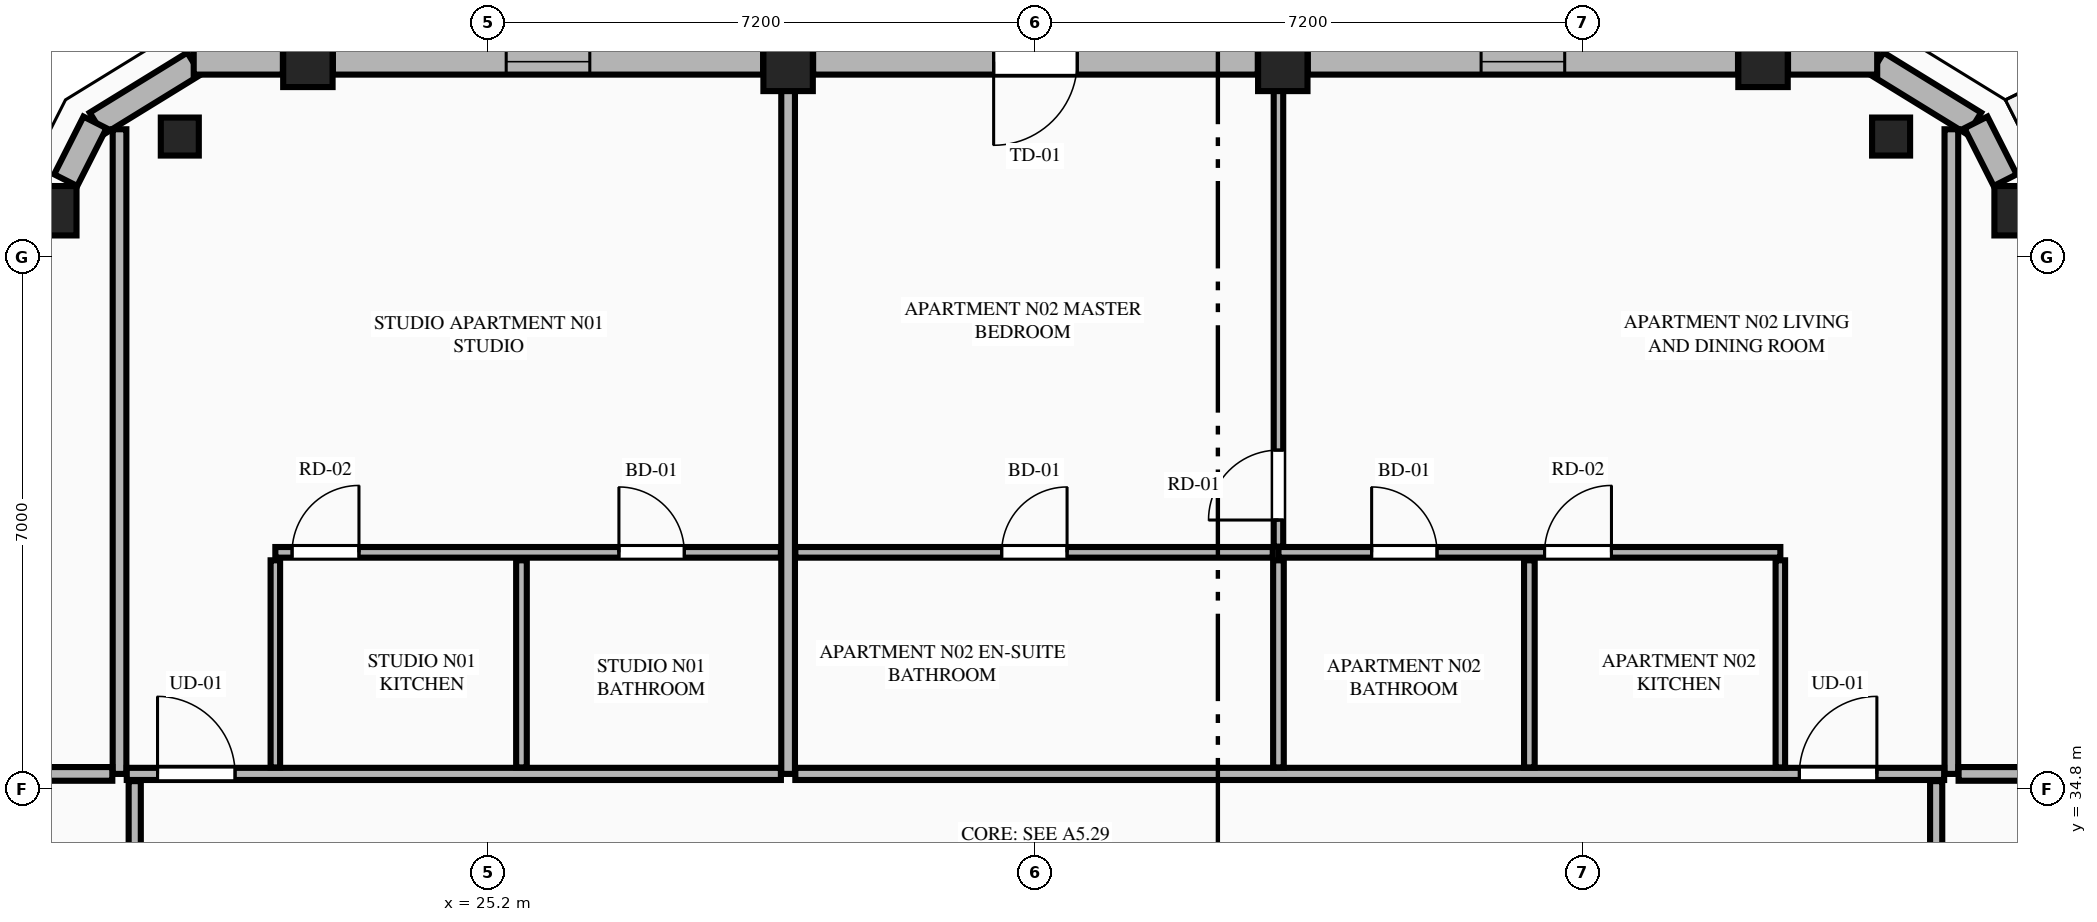
"""IFC4 building model, lengths in metres.
Left out: names, types, materials, properties, quantities, classifications, styles, units other than length and angle.
Written with IfcOpenShell. Run it as: python <this file> out.ifc"""

import sys

from ifc_helpers import new_model, si_unit, direction, frame, frame_2d, origin, origin_2d, place, context, subcontext, project, spatial, rectangle, extrude, element, fill, save


model = new_model("IFC4")
c1 = context("Model", 3, precision=1e-05, world=origin(), true_north=direction((0.0, 1.0)))
c2 = subcontext(c1, "Body", "Model", "MODEL_VIEW")
j1 = project(units=[si_unit("LENGTHUNIT", "METRE"), si_unit("PLANEANGLEUNIT", "RADIAN")], contexts=[c1])
p1 = place(None, origin())
s1 = spatial("IfcSite", under=j1, at=p1, CompositionType="ELEMENT")
p2 = place(p1, origin())
s2 = spatial("IfcBuilding", under=s1, at=p2, CompositionType="ELEMENT")
p3 = place(p2, frame((0.0, 0.0, 287.5)))
s3 = spatial("IfcBuildingStorey", under=s2, at=p3, CompositionType="ELEMENT", Elevation=287.5)
for number, where, z_axis, x_axis in (
    (1, (45.341, 42.409, 0.0), (0.0, 0.0, 1.0), (1.0, 0.0, 0.0)),
    (2, (41.972, 44.361, 0.0), (0.0, 0.0, 1.0), (1.0, 0.0, 0.0)),
    (3, (35.654, 44.308, 0.0), (0.0, 0.0, 1.0), (1.0, 0.0, 0.0)),
    (4, (29.146, 44.308, 0.0), (0.0, 0.0, 1.0), (1.0, 0.0, 0.0)),
    (5, (22.828, 44.361, 0.0), (0.0, 0.0, 1.0), (1.0, 0.0, 0.0)),
    (6, (19.459, 42.409, 0.0), (0.0, 0.0, 1.0), (1.0, 0.0, 0.0)),
):
    element("IfcColumn", number, at=place(p3, frame(where, z_axis=z_axis, x_axis=x_axis)), inside=s3, PredefinedType="COLUMN", context=c2, shape_type="SweptSolid", body=[
        extrude(rectangle(XDim=0.65, YDim=0.65, at=origin_2d()), origin(), (0.0, 0.0, 1.0), 4.0),
    ])
for number, where, z_axis, x_axis in (
    (7, (43.657, 43.385, 0.0), (0.0, 0.0, 1.0), (-0.865, 0.501, 0.0)),
    (8, (21.143, 43.385, 0.0), (0.0, 0.0, 1.0), (-0.865, -0.501, 0.0)),
):
    element("IfcColumn", number, at=place(p3, frame(where, z_axis=z_axis, x_axis=x_axis)), inside=s3, PredefinedType="PILASTER", context=c2, shape_type="SweptSolid", body=[
        extrude(rectangle(XDim=0.5, YDim=0.35, at=origin_2d()), origin(), (0.0, 0.0, 1.0), 4.0),
    ])
for number, where, z_axis, x_axis in (
    (9, (44.753, 43.555, 0.0), (0.0, 0.0, 1.0), (-0.852, 0.524, 0.0)),
    (10, (21.331, 44.345, 0.0), (0.0, 0.0, 1.0), (-0.852, -0.524, 0.0)),
):
    element("IfcWall", number, at=place(p3, frame(where, z_axis=z_axis, x_axis=x_axis)), inside=s3, PredefinedType="STANDARD", context=c2, shape_type="SweptSolid", body=[
        extrude(rectangle(XDim=1.508, YDim=0.34, at=frame_2d((0.754, 0.0))), origin(), (0.0, 0.0, 1.0), 3.8),
    ])
p4 = place(p3, frame((45.158, 42.811, 0.0), z_axis=(0.0, 0.0, 1.0), x_axis=(-0.451907025977, 0.8920650424, 0.0)))
e11 = element("IfcWall", 11, at=p4, inside=s3, PredefinedType="STANDARD", context=c2, shape_type="SweptSolid", body=[
    extrude(rectangle(XDim=0.852, YDim=0.34, at=frame_2d((0.426, 0.0))), origin(), (0.0, 0.0, 1.0), 3.8),
])
p5 = place(p3, frame((43.474, 44.37, 0.0), z_axis=(0.0, 0.0, 1.0), x_axis=(-1.0, 0.0, 0.0)))
e12 = element("IfcWall", 12, at=p5, inside=s3, PredefinedType="STANDARD", context=c2, shape_type="SweptSolid", body=[
    extrude(rectangle(XDim=1.173, YDim=0.34, at=frame_2d((0.586, 0.0))), origin(), (0.0, 0.0, 1.0), 3.8),
])
p6 = place(p3, frame((41.643, 44.37, 0.0), z_axis=(0.0, 0.0, 1.0), x_axis=(-1.0, 0.0, 0.0)))
e13 = element("IfcWall", 13, at=p6, inside=s3, PredefinedType="STANDARD", context=c2, shape_type="SweptSolid", body=[
    extrude(rectangle(XDim=5.66, YDim=0.34, at=frame_2d((2.83, 0.0))), origin(), (0.0, 0.0, 1.0), 2.99),
])
p7 = place(p6, frame((2.28, 0.0, 0.75)))
e14 = element("IfcOpeningElement", 14, at=p7, cuts=e13, PredefinedType="OPENING", context=c2, shape_type="SweptSolid", body=[
    extrude(rectangle(XDim=1.1, YDim=2.0, at=frame_2d((0.55, 1.0))), frame((0.0, 0.18, 0.0), z_axis=(0.0, -1.0, 0.0), x_axis=(1.0, 0.0, 0.0)), (0.0, 0.0, 1.0), 0.36),
])
p8 = place(p3, frame((35.325, 44.37, 0.0), z_axis=(0.0, 0.0, 1.0), x_axis=(-1.0, 0.0, 0.0)))
e15 = element("IfcWall", 15, at=p8, inside=s3, PredefinedType="STANDARD", context=c2, shape_type="SweptSolid", body=[
    extrude(rectangle(XDim=5.85, YDim=0.34, at=frame_2d((2.925, 0.0))), origin(), (0.0, 0.0, 1.0), 2.99),
])
p9 = place(p8, frame((2.375, 0.0, 0.0)))
e16 = element("IfcOpeningElement", 16, at=p9, cuts=e15, PredefinedType="OPENING", context=c2, shape_type="SweptSolid", body=[
    extrude(rectangle(XDim=1.1, YDim=2.25, at=frame_2d((0.55, 1.125))), frame((0.0, 0.18, 0.0), z_axis=(0.0, -1.0, 0.0), x_axis=(1.0, 0.0, 0.0)), (0.0, 0.0, 1.0), 0.36),
])
p10 = place(p3, frame((28.817, 44.37, 0.0), z_axis=(0.0, 0.0, 1.0), x_axis=(-1.0, 0.0, 0.0)))
e17 = element("IfcWall", 17, at=p10, inside=s3, PredefinedType="STANDARD", context=c2, shape_type="SweptSolid", body=[
    extrude(rectangle(XDim=5.66, YDim=0.34, at=frame_2d((2.83, 0.0))), origin(), (0.0, 0.0, 1.0), 2.99),
])
p11 = place(p10, frame((2.28, 0.0, 0.75)))
e18 = element("IfcOpeningElement", 18, at=p11, cuts=e17, PredefinedType="OPENING", context=c2, shape_type="SweptSolid", body=[
    extrude(rectangle(XDim=1.1, YDim=2.0, at=frame_2d((0.55, 1.0))), frame((0.0, 0.18, 0.0), z_axis=(0.0, -1.0, 0.0), x_axis=(1.0, 0.0, 0.0)), (0.0, 0.0, 1.0), 0.36),
])
p12 = place(p3, frame((22.499, 44.37, 0.0), z_axis=(0.0, 0.0, 1.0), x_axis=(-1.0, 0.0, 0.0)))
e19 = element("IfcWall", 19, at=p12, inside=s3, PredefinedType="STANDARD", context=c2, shape_type="SweptSolid", body=[
    extrude(rectangle(XDim=1.173, YDim=0.34, at=frame_2d((0.586, 0.0))), origin(), (0.0, 0.0, 1.0), 3.8),
])
p13 = place(p3, frame((20.027, 43.571, 0.0), z_axis=(0.0, 0.0, 1.0), x_axis=(-0.451907025977, -0.8920650424, 0.0)))
e20 = element("IfcWall", 20, at=p13, inside=s3, PredefinedType="STANDARD", context=c2, shape_type="SweptSolid", body=[
    extrude(rectangle(XDim=0.852, YDim=0.34, at=frame_2d((0.426, 0.0))), origin(), (0.0, 0.0, 1.0), 3.8),
])
p14 = place(p3, frame((20.35, 35.0, 0.0), z_axis=(0.0, 0.0, 1.0), x_axis=(0.0, 1.0, 0.0)))
e21 = element("IfcWall", 21, at=p14, inside=s3, PredefinedType="PARTITIONING", context=c2, shape_type="SweptSolid", body=[
    extrude(rectangle(XDim=8.481, YDim=0.18, at=frame_2d((4.24, 0.0))), origin(), (0.0, 0.0, 1.0), 3.8),
])
p15 = place(p3, frame((29.146, 35.0, 0.0), z_axis=(0.0, 0.0, 1.0), x_axis=(0.0, 1.0, 0.0)))
e22 = element("IfcWall", 22, at=p15, inside=s3, PredefinedType="PARTITIONING", context=c2, shape_type="SweptSolid", body=[
    extrude(rectangle(XDim=9.195, YDim=0.18, at=frame_2d((4.598, 0.0))), origin(), (0.0, 0.0, 1.0), 3.257),
])
p16 = place(p3, frame((44.45, 35.0, 0.0), z_axis=(0.0, 0.0, 1.0), x_axis=(0.0, 1.0, 0.0)))
e23 = element("IfcWall", 23, at=p16, inside=s3, PredefinedType="PARTITIONING", context=c2, shape_type="SweptSolid", body=[
    extrude(rectangle(XDim=8.481, YDim=0.18, at=frame_2d((4.24, 0.0))), origin(), (0.0, 0.0, 1.0), 3.8),
])
p17 = place(p3, frame((20.445, 35.0, 0.0), z_axis=(0.0, 0.0, 1.0), x_axis=(1.0, 0.0, 0.0)))
e24 = element("IfcWall", 24, at=p17, inside=s3, PredefinedType="PARTITIONING", context=c2, shape_type="SweptSolid", body=[
    extrude(rectangle(XDim=8.606, YDim=0.16, at=frame_2d((4.303, 0.0))), origin(), (0.0, 0.0, 1.0), 3.8),
])
p18 = place(p17, frame((0.405, 0.0, 0.0)))
e25 = element("IfcOpeningElement", 25, at=p18, cuts=e24, PredefinedType="OPENING", context=c2, shape_type="SweptSolid", body=[
    extrude(rectangle(XDim=1.02, YDim=2.25, at=frame_2d((0.51, 1.125))), frame((0.0, 0.09, 0.0), z_axis=(0.0, -1.0, 0.0), x_axis=(1.0, 0.0, 0.0)), (0.0, 0.0, 1.0), 0.18),
])
p19 = place(p3, frame((22.4, 35.085, 0.0), z_axis=(0.0, 0.0, 1.0), x_axis=(0.0, 1.0, 0.0)))
e26 = element("IfcWall", 26, at=p19, inside=s3, PredefinedType="PARTITIONING", context=c2, shape_type="SweptSolid", body=[
    extrude(rectangle(XDim=2.725, YDim=0.125, at=frame_2d((1.363, 0.0))), origin(), (0.0, 0.0, 1.0), 3.8),
])
p20 = place(p3, frame((22.4, 37.915, 0.0), z_axis=(0.0, 0.0, 1.0), x_axis=(1.0, 0.0, 0.0)))
e27 = element("IfcWall", 27, at=p20, inside=s3, PredefinedType="PLUMBINGWALL", context=c2, shape_type="SweptSolid", body=[
    extrude(rectangle(XDim=6.651, YDim=0.14, at=frame_2d((3.326, 0.0))), origin(), (0.0, 0.0, 1.0), 3.8),
])
p21 = place(p20, frame((4.52, 0.0, 0.0)))
e28 = element("IfcOpeningElement", 28, at=p21, cuts=e27, PredefinedType="OPENING", context=c2, shape_type="SweptSolid", body=[
    extrude(rectangle(XDim=0.86, YDim=2.1, at=frame_2d((0.43, 1.05))), frame((0.0, 0.08, 0.0), z_axis=(0.0, -1.0, 0.0), x_axis=(1.0, 0.0, 0.0)), (0.0, 0.0, 1.0), 0.16),
])
p22 = place(p20, frame((0.22, 0.0, 0.0)))
e29 = element("IfcOpeningElement", 29, at=p22, cuts=e27, PredefinedType="OPENING", context=c2, shape_type="SweptSolid", body=[
    extrude(rectangle(XDim=0.88, YDim=2.15, at=frame_2d((0.44, 1.075))), frame((0.0, 0.08, 0.0), z_axis=(0.0, -1.0, 0.0), x_axis=(1.0, 0.0, 0.0)), (0.0, 0.0, 1.0), 0.16),
])
p23 = place(p3, frame((25.638, 35.085, 0.0), z_axis=(0.0, 0.0, 1.0), x_axis=(0.0, 1.0, 0.0)))
e30 = element("IfcWall", 30, at=p23, inside=s3, PredefinedType="PLUMBINGWALL", context=c2, shape_type="SweptSolid", body=[
    extrude(rectangle(XDim=2.725, YDim=0.14, at=frame_2d((1.363, 0.0))), origin(), (0.0, 0.0, 1.0), 3.8),
])
p24 = place(p3, frame((29.241, 35.0, 0.0), z_axis=(0.0, 0.0, 1.0), x_axis=(1.0, 0.0, 0.0)))
e31 = element("IfcWall", 31, at=p24, inside=s3, PredefinedType="PARTITIONING", context=c2, shape_type="SweptSolid", body=[
    extrude(rectangle(XDim=15.114, YDim=0.16, at=frame_2d((7.557, 0.0))), origin(), (0.0, 0.0, 1.0), 3.8),
])
p25 = place(p24, frame((13.209, 0.0, 0.0)))
e32 = element("IfcOpeningElement", 32, at=p25, cuts=e31, PredefinedType="OPENING", context=c2, shape_type="SweptSolid", body=[
    extrude(rectangle(XDim=1.02, YDim=2.25, at=frame_2d((0.51, 1.125))), frame((0.0, 0.09, 0.0), z_axis=(0.0, -1.0, 0.0), x_axis=(1.0, 0.0, 0.0)), (0.0, 0.0, 1.0), 0.18),
])
p26 = place(p3, frame((42.2, 35.085, 0.0), z_axis=(0.0, 0.0, 1.0), x_axis=(0.0, 1.0, 0.0)))
e33 = element("IfcWall", 33, at=p26, inside=s3, PredefinedType="PARTITIONING", context=c2, shape_type="SweptSolid", body=[
    extrude(rectangle(XDim=2.725, YDim=0.125, at=frame_2d((1.363, 0.0))), origin(), (0.0, 0.0, 1.0), 3.8),
])
p27 = place(p3, frame((35.597, 37.915, 0.0), z_axis=(0.0, 0.0, 1.0), x_axis=(1.0, 0.0, 0.0)))
e34 = element("IfcWall", 34, at=p27, inside=s3, PredefinedType="PLUMBINGWALL", context=c2, shape_type="SweptSolid", body=[
    extrude(rectangle(XDim=6.603, YDim=0.14, at=frame_2d((3.302, 0.0))), origin(), (0.0, 0.0, 1.0), 3.8),
])
p28 = place(p27, frame((1.226, 0.0, 0.0)))
e35 = element("IfcOpeningElement", 35, at=p28, cuts=e34, PredefinedType="OPENING", context=c2, shape_type="SweptSolid", body=[
    extrude(rectangle(XDim=0.86, YDim=2.1, at=frame_2d((0.43, 1.05))), frame((0.0, 0.08, 0.0), z_axis=(0.0, -1.0, 0.0), x_axis=(1.0, 0.0, 0.0)), (0.0, 0.0, 1.0), 0.16),
])
p29 = place(p27, frame((3.501, 0.0, 0.0)))
e36 = element("IfcOpeningElement", 36, at=p29, cuts=e34, PredefinedType="OPENING", context=c2, shape_type="SweptSolid", body=[
    extrude(rectangle(XDim=0.88, YDim=2.15, at=frame_2d((0.44, 1.075))), frame((0.0, 0.08, 0.0), z_axis=(0.0, -1.0, 0.0), x_axis=(1.0, 0.0, 0.0)), (0.0, 0.0, 1.0), 0.16),
])
p30 = place(p3, frame((29.241, 37.915, 0.0), z_axis=(0.0, 0.0, 1.0), x_axis=(1.0, 0.0, 0.0)))
e37 = element("IfcWall", 37, at=p30, inside=s3, PredefinedType="PLUMBINGWALL", context=c2, shape_type="SweptSolid", body=[
    extrude(rectangle(XDim=6.281, YDim=0.14, at=frame_2d((3.141, 0.0))), origin(), (0.0, 0.0, 1.0), 3.8),
])
p31 = place(p30, frame((2.715, 0.0, 0.0)))
e38 = element("IfcOpeningElement", 38, at=p31, cuts=e37, PredefinedType="OPENING", context=c2, shape_type="SweptSolid", body=[
    extrude(rectangle(XDim=0.86, YDim=2.1, at=frame_2d((0.43, 1.05))), frame((0.0, 0.08, 0.0), z_axis=(0.0, -1.0, 0.0), x_axis=(1.0, 0.0, 0.0)), (0.0, 0.0, 1.0), 0.16),
])
p32 = place(p3, frame((38.898, 35.085, 0.0), z_axis=(0.0, 0.0, 1.0), x_axis=(0.0, 1.0, 0.0)))
e39 = element("IfcWall", 39, at=p32, inside=s3, PredefinedType="PLUMBINGWALL", context=c2, shape_type="SweptSolid", body=[
    extrude(rectangle(XDim=2.725, YDim=0.14, at=frame_2d((1.363, 0.0))), origin(), (0.0, 0.0, 1.0), 3.8),
])
p33 = place(p3, frame((35.597, 35.085, 0.0), z_axis=(0.0, 0.0, 1.0), x_axis=(0.0, 1.0, 0.0)))
e40 = element("IfcWall", 40, at=p33, inside=s3, PredefinedType="PLUMBINGWALL", context=c2, shape_type="SweptSolid", body=[
    extrude(rectangle(XDim=2.725, YDim=0.14, at=frame_2d((1.363, 0.0))), origin(), (0.0, 0.0, 1.0), 3.257),
])
p34 = place(p3, frame((35.597, 37.99, 0.0), z_axis=(0.0, 0.0, 1.0), x_axis=(0.0, 1.0, 0.0)))
e41 = element("IfcWall", 41, at=p34, inside=s3, PredefinedType="PARTITIONING", context=c2, shape_type="SweptSolid", body=[
    extrude(rectangle(XDim=6.295, YDim=0.125, at=frame_2d((3.147, 0.0))), origin(), (0.0, 0.0, 1.0), 3.257),
])
p35 = place(p34, frame((0.35, 0.0, 0.0)))
e42 = element("IfcOpeningElement", 42, at=p35, cuts=e41, PredefinedType="OPENING", context=c2, shape_type="SweptSolid", body=[
    extrude(rectangle(XDim=0.92, YDim=2.15, at=frame_2d((0.46, 1.075))), frame((0.0, 0.073, 0.0), z_axis=(0.0, -1.0, 0.0), x_axis=(1.0, 0.0, 0.0)), (0.0, 0.0, 1.0), 0.145),
])
p36 = place(p3, frame((15.933, 35.0, 0.0), z_axis=(0.0, 0.0, 1.0), x_axis=(1.0, 0.0, 0.0)))
e43 = element("IfcWall", 43, at=p36, inside=s3, PredefinedType="PARTITIONING", context=c2, shape_type="SweptSolid", body=[
    extrude(rectangle(XDim=4.322, YDim=0.18, at=frame_2d((2.161, 0.0))), origin(), (0.0, 0.0, 1.0), 3.8),
])
p37 = place(p3, frame((44.545, 35.0, 0.0), z_axis=(0.0, 0.0, 1.0), x_axis=(1.0, 0.0, 0.0)))
e44 = element("IfcWall", 44, at=p37, inside=s3, PredefinedType="PARTITIONING", context=c2, shape_type="SweptSolid", body=[
    extrude(rectangle(XDim=4.322, YDim=0.18, at=frame_2d((2.161, 0.0))), origin(), (0.0, 0.0, 1.0), 3.8),
])
p38 = place(p3, frame((20.55, 16.495, 0.0), z_axis=(0.0, 0.0, 1.0), x_axis=(0.0, 1.0, 0.0)))
e45 = element("IfcWall", 45, at=p38, inside=s3, PredefinedType="PARTITIONING", context=c2, shape_type="SweptSolid", body=[
    extrude(rectangle(XDim=18.41, YDim=0.16, at=frame_2d((9.205, 0.0))), origin(), (0.0, 0.0, 1.0), 3.487),
])
p39 = place(p38, frame((0.4, 0.0, 0.0)))
e46 = element("IfcOpeningElement", 46, at=p39, cuts=e45, PredefinedType="OPENING", context=c2, shape_type="SweptSolid", body=[
    extrude(rectangle(XDim=1.02, YDim=2.25, at=frame_2d((0.51, 1.125))), frame((0.0, 0.09, 0.0), z_axis=(0.0, -1.0, 0.0), x_axis=(1.0, 0.0, 0.0)), (0.0, 0.0, 1.0), 0.18),
])
p40 = place(p3, frame((44.25, 25.795, 0.0), z_axis=(0.0, 0.0, 1.0), x_axis=(0.0, 1.0, 0.0)))
e47 = element("IfcWall", 47, at=p40, inside=s3, PredefinedType="PARTITIONING", context=c2, shape_type="SweptSolid", body=[
    extrude(rectangle(XDim=9.11, YDim=0.16, at=frame_2d((4.555, 0.0))), origin(), (0.0, 0.0, 1.0), 3.487),
])
p41 = place(p40, frame((0.45, 0.0, 0.0)))
e48 = element("IfcOpeningElement", 48, at=p41, cuts=e47, PredefinedType="OPENING", context=c2, shape_type="SweptSolid", body=[
    extrude(rectangle(XDim=1.02, YDim=2.25, at=frame_2d((0.51, 1.125))), frame((0.0, 0.09, 0.0), z_axis=(0.0, -1.0, 0.0), x_axis=(1.0, 0.0, 0.0)), (0.0, 0.0, 1.0), 0.18),
])
p42 = place(p7, origin())
e49 = element("IfcWindow", 49, at=p42, inside=s3, PartitioningType="SINGLE_PANEL", PredefinedType="WINDOW", context=c2, shape_type="SweptSolid", body=[
    extrude(rectangle(XDim=1.1, YDim=2.0, at=frame_2d((0.55, 1.0))), frame((0.0, 0.03, 0.0), z_axis=(0.0, -1.0, 0.0), x_axis=(1.0, 0.0, 0.0)), (0.0, 0.0, 1.0), 0.06),
])
fill(e14, e49)
p43 = place(p9, origin())
e50 = element("IfcDoor", 50, at=p43, inside=s3, OperationType="SINGLE_SWING_RIGHT", PredefinedType="DOOR", context=c2, shape_type="SweptSolid", body=[
    extrude(rectangle(XDim=1.1, YDim=2.25, at=frame_2d((0.55, 1.125))), frame((0.0, 0.025, 0.0), z_axis=(0.0, -1.0, 0.0), x_axis=(1.0, 0.0, 0.0)), (0.0, 0.0, 1.0), 0.05),
])
fill(e16, e50)
p44 = place(p11, origin())
e51 = element("IfcWindow", 51, at=p44, inside=s3, PartitioningType="SINGLE_PANEL", PredefinedType="WINDOW", context=c2, shape_type="SweptSolid", body=[
    extrude(rectangle(XDim=1.1, YDim=2.0, at=frame_2d((0.55, 1.0))), frame((0.0, 0.03, 0.0), z_axis=(0.0, -1.0, 0.0), x_axis=(1.0, 0.0, 0.0)), (0.0, 0.0, 1.0), 0.06),
])
fill(e18, e51)
p45 = place(p21, origin())
e52 = element("IfcDoor", 52, at=p45, inside=s3, OperationType="SINGLE_SWING_LEFT", PredefinedType="DOOR", context=c2, shape_type="SweptSolid", body=[
    extrude(rectangle(XDim=0.86, YDim=2.1, at=frame_2d((0.43, 1.05))), frame((0.0, 0.025, 0.0), z_axis=(0.0, -1.0, 0.0), x_axis=(1.0, 0.0, 0.0)), (0.0, 0.0, 1.0), 0.05),
])
fill(e28, e52)
p46 = place(p18, origin())
e53 = element("IfcDoor", 53, at=p46, inside=s3, OperationType="SINGLE_SWING_LEFT", PredefinedType="DOOR", context=c2, shape_type="SweptSolid", body=[
    extrude(rectangle(XDim=1.02, YDim=2.25, at=frame_2d((0.51, 1.125))), frame((0.0, 0.025, 0.0), z_axis=(0.0, -1.0, 0.0), x_axis=(1.0, 0.0, 0.0)), (0.0, 0.0, 1.0), 0.05),
])
fill(e25, e53)
p47 = place(p22, origin())
e54 = element("IfcDoor", 54, at=p47, inside=s3, OperationType="SINGLE_SWING_RIGHT", PredefinedType="DOOR", context=c2, shape_type="SweptSolid", body=[
    extrude(rectangle(XDim=0.88, YDim=2.15, at=frame_2d((0.44, 1.075))), frame((0.0, 0.025, 0.0), z_axis=(0.0, -1.0, 0.0), x_axis=(1.0, 0.0, 0.0)), (0.0, 0.0, 1.0), 0.05),
])
fill(e29, e54)
p48 = place(p28, origin())
e55 = element("IfcDoor", 55, at=p48, inside=s3, OperationType="SINGLE_SWING_LEFT", PredefinedType="DOOR", context=c2, shape_type="SweptSolid", body=[
    extrude(rectangle(XDim=0.86, YDim=2.1, at=frame_2d((0.43, 1.05))), frame((0.0, 0.025, 0.0), z_axis=(0.0, -1.0, 0.0), x_axis=(1.0, 0.0, 0.0)), (0.0, 0.0, 1.0), 0.05),
])
fill(e35, e55)
p49 = place(p31, origin())
e56 = element("IfcDoor", 56, at=p49, inside=s3, OperationType="SINGLE_SWING_RIGHT", PredefinedType="DOOR", context=c2, shape_type="SweptSolid", body=[
    extrude(rectangle(XDim=0.86, YDim=2.1, at=frame_2d((0.43, 1.05))), frame((0.0, 0.025, 0.0), z_axis=(0.0, -1.0, 0.0), x_axis=(1.0, 0.0, 0.0)), (0.0, 0.0, 1.0), 0.05),
])
fill(e38, e56)
p50 = place(p25, origin())
e57 = element("IfcDoor", 57, at=p50, inside=s3, OperationType="SINGLE_SWING_RIGHT", PredefinedType="DOOR", context=c2, shape_type="SweptSolid", body=[
    extrude(rectangle(XDim=1.02, YDim=2.25, at=frame_2d((0.51, 1.125))), frame((0.0, 0.025, 0.0), z_axis=(0.0, -1.0, 0.0), x_axis=(1.0, 0.0, 0.0)), (0.0, 0.0, 1.0), 0.05),
])
fill(e32, e57)
p51 = place(p29, origin())
e58 = element("IfcDoor", 58, at=p51, inside=s3, OperationType="SINGLE_SWING_RIGHT", PredefinedType="DOOR", context=c2, shape_type="SweptSolid", body=[
    extrude(rectangle(XDim=0.88, YDim=2.15, at=frame_2d((0.44, 1.075))), frame((0.0, 0.025, 0.0), z_axis=(0.0, -1.0, 0.0), x_axis=(1.0, 0.0, 0.0)), (0.0, 0.0, 1.0), 0.05),
])
fill(e36, e58)
p52 = place(p35, origin())
e59 = element("IfcDoor", 59, at=p52, inside=s3, OperationType="SINGLE_SWING_LEFT", PredefinedType="DOOR", context=c2, shape_type="SweptSolid", body=[
    extrude(rectangle(XDim=0.92, YDim=2.15, at=frame_2d((0.46, 1.075))), frame((0.0, 0.025, 0.0), z_axis=(0.0, -1.0, 0.0), x_axis=(1.0, 0.0, 0.0)), (0.0, 0.0, 1.0), 0.05),
])
fill(e42, e59)
save(model, sys.argv[1])
